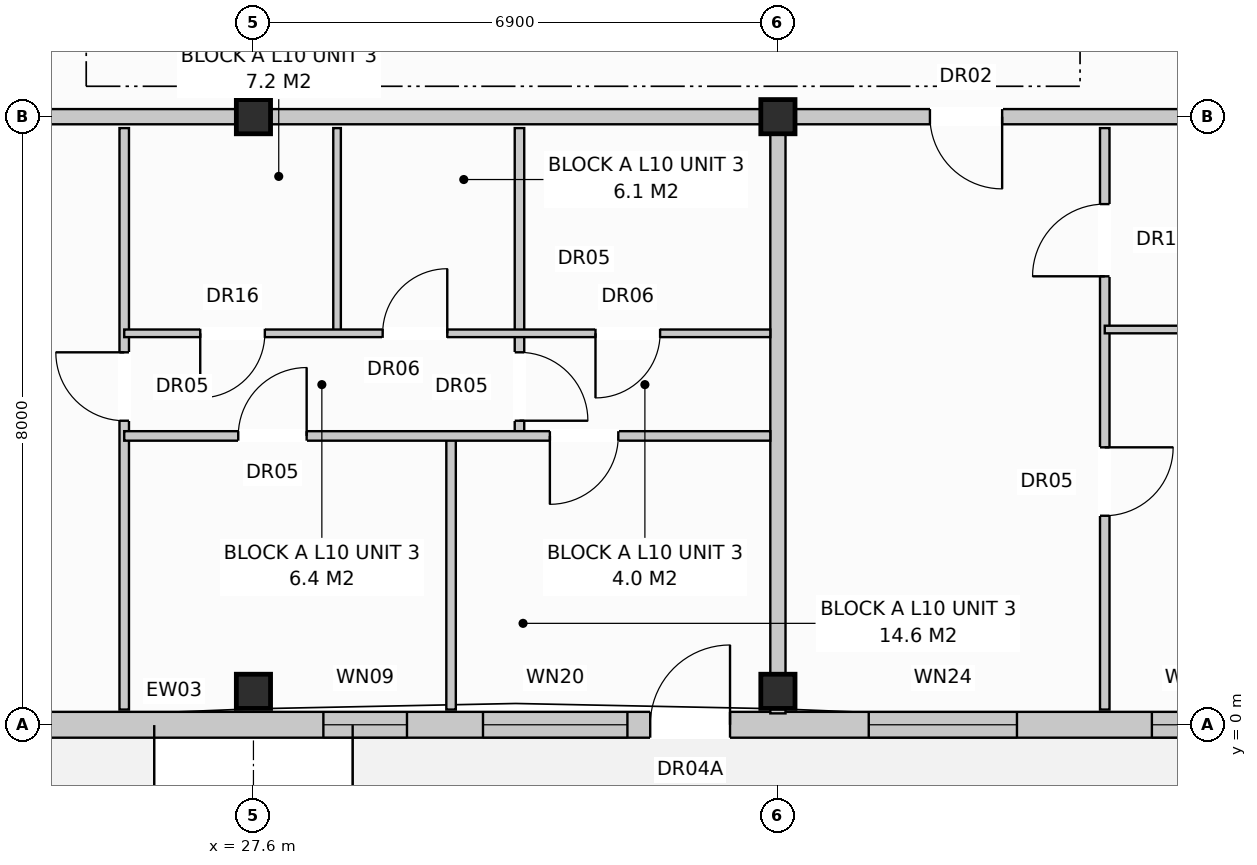
"""IFC4 building model, lengths in metres.
Left out: names, types, materials, properties, quantities, classifications, styles, units other than length and angle.
Written with IfcOpenShell. Run it as: python <this file> out.ifc"""

import sys

from ifc_helpers import new_model, si_unit, direction, frame, frame_2d, origin, origin_with_axes, origin_2d, place, context, subcontext, project, spatial, rectangle, extrude, element, fill, save


model = new_model("IFC4")
c1 = context("Model", 3, precision=1e-05, world=origin(), true_north=direction((0.0, 1.0)))
c2 = subcontext(c1, "Body", "Model", "MODEL_VIEW")
j1 = project(units=[si_unit("LENGTHUNIT", "METRE"), si_unit("PLANEANGLEUNIT", "RADIAN")], contexts=[c1])
p1 = place(None, origin())
s1 = spatial("IfcSite", under=j1, at=p1, CompositionType="ELEMENT")
p2 = place(p1, origin())
s2 = spatial("IfcBuilding", under=s1, at=p2, CompositionType="ELEMENT")
p3 = place(p2, frame((0.0, 0.0, 33.6)))
s3 = spatial("IfcBuildingStorey", under=s2, at=p3, CompositionType="ELEMENT", Elevation=33.6)
for number, where, z_axis, x_axis in (
    (1, (27.6, 0.44, 0.0), (0.0, 0.0, 1.0), (1.0, 0.0, 0.0)),
    (2, (27.6, 8.0, 0.0), (0.0, 0.0, 1.0), (1.0, 0.0, 0.0)),
    (3, (34.5, 0.44, 0.0), (0.0, 0.0, 1.0), (1.0, 0.0, 0.0)),
    (4, (34.5, 8.0, 0.0), (0.0, 0.0, 1.0), (1.0, 0.0, 0.0)),
):
    element("IfcColumn", number, at=place(p3, frame(where, z_axis=z_axis, x_axis=x_axis)), inside=s3, PredefinedType="COLUMN", context=c2, shape_type="SweptSolid", body=[
        extrude(rectangle(XDim=0.45, YDim=0.45, at=origin_2d()), origin(), (0.0, 0.0, 1.0), 3.2),
    ])
p4 = place(p3, frame((0.16, 0.0, 0.0), z_axis=(0.0, 0.0, 1.0), x_axis=(1.0, 0.0, 0.0)))
e5 = element("IfcWall", 5, at=p4, inside=s3, PredefinedType="STANDARD", context=c2, shape_type="SweptSolid", body=[
    extrude(rectangle(XDim=41.08, YDim=0.34, at=frame_2d((20.54, 0.0))), origin(), (0.0, 0.0, 1.0), 2.96),
])
p5 = place(p4, frame((2.465, 0.0, 0.0)))
e6 = element("IfcOpeningElement", 6, at=p5, cuts=e5, PredefinedType="OPENING", context=c2, shape_type="SweptSolid", body=[
    extrude(rectangle(XDim=1.05, YDim=2.12, at=frame_2d((0.525, 1.06))), frame((0.0, 0.182, 0.0), z_axis=(0.0, -1.0, 0.0), x_axis=(1.0, 0.0, 0.0)), (0.0, 0.0, 1.0), 0.364),
])
p6 = place(p4, frame((18.86, 0.0, 0.0)))
e7 = element("IfcOpeningElement", 7, at=p6, cuts=e5, PredefinedType="OPENING", context=c2, shape_type="SweptSolid", body=[
    extrude(rectangle(XDim=1.05, YDim=2.12, at=frame_2d((0.525, 1.06))), frame((0.0, 0.182, 0.0), z_axis=(0.0, -1.0, 0.0), x_axis=(1.0, 0.0, 0.0)), (0.0, 0.0, 1.0), 0.364),
])
p7 = place(p4, frame((32.66, 0.0, 0.0)))
e8 = element("IfcOpeningElement", 8, at=p7, cuts=e5, PredefinedType="OPENING", context=c2, shape_type="SweptSolid", body=[
    extrude(rectangle(XDim=1.05, YDim=2.12, at=frame_2d((0.525, 1.06))), frame((0.0, 0.182, 0.0), z_axis=(0.0, -1.0, 0.0), x_axis=(1.0, 0.0, 0.0)), (0.0, 0.0, 1.0), 0.364),
])
p8 = place(p4, frame((0.76, 0.0, 0.72)))
e9 = element("IfcOpeningElement", 9, at=p8, cuts=e5, PredefinedType="OPENING", context=c2, shape_type="SweptSolid", body=[
    extrude(rectangle(XDim=1.1, YDim=1.5, at=frame_2d((0.55, 0.75))), frame((0.0, 0.182, 0.0), z_axis=(0.0, -1.0, 0.0), x_axis=(1.0, 0.0, 0.0)), (0.0, 0.0, 1.0), 0.364),
])
p9 = place(p4, frame((4.26, 0.0, 0.72)))
e10 = element("IfcOpeningElement", 10, at=p9, cuts=e5, PredefinedType="OPENING", context=c2, shape_type="SweptSolid", body=[
    extrude(rectangle(XDim=1.9, YDim=1.85, at=frame_2d((0.95, 0.925))), frame((0.0, 0.182, 0.0), z_axis=(0.0, -1.0, 0.0), x_axis=(1.0, 0.0, 0.0)), (0.0, 0.0, 1.0), 0.364),
])
p10 = place(p4, frame((7.935, 0.0, 0.8)))
e11 = element("IfcOpeningElement", 11, at=p10, cuts=e5, PredefinedType="OPENING", context=c2, shape_type="SweptSolid", body=[
    extrude(rectangle(XDim=1.95, YDim=1.65, at=frame_2d((0.975, 0.825))), frame((0.0, 0.182, 0.0), z_axis=(0.0, -1.0, 0.0), x_axis=(1.0, 0.0, 0.0)), (0.0, 0.0, 1.0), 0.364),
])
p11 = place(p4, frame((11.66, 0.0, 0.72)))
e12 = element("IfcOpeningElement", 12, at=p11, cuts=e5, PredefinedType="OPENING", context=c2, shape_type="SweptSolid", body=[
    extrude(rectangle(XDim=1.1, YDim=1.5, at=frame_2d((0.55, 0.75))), frame((0.0, 0.182, 0.0), z_axis=(0.0, -1.0, 0.0), x_axis=(1.0, 0.0, 0.0)), (0.0, 0.0, 1.0), 0.364),
])
p12 = place(p4, frame((16.735, 0.0, 0.8)))
e13 = element("IfcOpeningElement", 13, at=p12, cuts=e5, PredefinedType="OPENING", context=c2, shape_type="SweptSolid", body=[
    extrude(rectangle(XDim=1.9, YDim=1.85, at=frame_2d((0.95, 0.925))), frame((0.0, 0.182, 0.0), z_axis=(0.0, -1.0, 0.0), x_axis=(1.0, 0.0, 0.0)), (0.0, 0.0, 1.0), 0.364),
])
p13 = place(p4, frame((22.235, 0.0, 0.8)))
e14 = element("IfcOpeningElement", 14, at=p13, cuts=e5, PredefinedType="OPENING", context=c2, shape_type="SweptSolid", body=[
    extrude(rectangle(XDim=1.95, YDim=1.65, at=frame_2d((0.975, 0.825))), frame((0.0, 0.182, 0.0), z_axis=(0.0, -1.0, 0.0), x_axis=(1.0, 0.0, 0.0)), (0.0, 0.0, 1.0), 0.364),
])
p14 = place(p4, frame((28.36, 0.0, 0.72)))
e15 = element("IfcOpeningElement", 15, at=p14, cuts=e5, PredefinedType="OPENING", context=c2, shape_type="SweptSolid", body=[
    extrude(rectangle(XDim=1.1, YDim=1.5, at=frame_2d((0.55, 0.75))), frame((0.0, 0.182, 0.0), z_axis=(0.0, -1.0, 0.0), x_axis=(1.0, 0.0, 0.0)), (0.0, 0.0, 1.0), 0.364),
])
p15 = place(p4, frame((30.46, 0.0, 0.8)))
e16 = element("IfcOpeningElement", 16, at=p15, cuts=e5, PredefinedType="OPENING", context=c2, shape_type="SweptSolid", body=[
    extrude(rectangle(XDim=1.9, YDim=1.85, at=frame_2d((0.95, 0.925))), frame((0.0, 0.182, 0.0), z_axis=(0.0, -1.0, 0.0), x_axis=(1.0, 0.0, 0.0)), (0.0, 0.0, 1.0), 0.364),
])
p16 = place(p4, frame((35.535, 0.0, 0.8)))
e17 = element("IfcOpeningElement", 17, at=p16, cuts=e5, PredefinedType="OPENING", context=c2, shape_type="SweptSolid", body=[
    extrude(rectangle(XDim=1.95, YDim=1.65, at=frame_2d((0.975, 0.825))), frame((0.0, 0.182, 0.0), z_axis=(0.0, -1.0, 0.0), x_axis=(1.0, 0.0, 0.0)), (0.0, 0.0, 1.0), 0.364),
])
p17 = place(p4, frame((39.26, 0.0, 0.72)))
e18 = element("IfcOpeningElement", 18, at=p17, cuts=e5, PredefinedType="OPENING", context=c2, shape_type="SweptSolid", body=[
    extrude(rectangle(XDim=1.1, YDim=1.5, at=frame_2d((0.55, 0.75))), frame((0.0, 0.182, 0.0), z_axis=(0.0, -1.0, 0.0), x_axis=(1.0, 0.0, 0.0)), (0.0, 0.0, 1.0), 0.364),
])
p18 = place(p3, frame((34.5, 7.85, 0.0), z_axis=(0.0, 0.0, 1.0), x_axis=(0.0, -1.0, 0.0)))
e19 = element("IfcWall", 19, at=p18, inside=s3, PredefinedType="PARTITIONING", context=c2, shape_type="SweptSolid", body=[
    extrude(rectangle(XDim=7.7, YDim=0.2, at=frame_2d((3.85, 0.0))), origin(), (0.0, 0.0, 1.0), 2.4),
])
p19 = place(p3, frame((20.7, 8.0, 0.0), z_axis=(0.0, 0.0, 1.0), x_axis=(1.0, 0.0, 0.0)))
e20 = element("IfcWall", 20, at=p19, inside=s3, PredefinedType="PARTITIONING", context=c2, shape_type="SweptSolid", body=[
    extrude(rectangle(XDim=13.8, YDim=0.2, at=frame_2d((6.9, 0.0))), origin(), (0.0, 0.0, 1.0), 2.4),
])
p20 = place(p19, frame((2.4, 0.0, 0.0)))
e21 = element("IfcOpeningElement", 21, at=p20, cuts=e20, PredefinedType="OPENING", context=c2, shape_type="SweptSolid", body=[
    extrude(rectangle(XDim=0.95, YDim=2.15, at=frame_2d((0.475, 1.075))), frame((0.0, 0.112, 0.0), z_axis=(0.0, -1.0, 0.0), x_axis=(1.0, 0.0, 0.0)), (0.0, 0.0, 1.0), 0.224),
])
p21 = place(p3, frame((25.9, 7.85, 0.0), z_axis=(0.0, 0.0, 1.0), x_axis=(0.0, -1.0, 0.0)))
e22 = element("IfcWall", 22, at=p21, inside=s3, PredefinedType="PARTITIONING", context=c2, shape_type="SweptSolid", body=[
    extrude(rectangle(XDim=7.65, YDim=0.125, at=frame_2d((3.825, 0.0))), origin(), (0.0, 0.0, 1.0), 2.59),
])
p22 = place(p21, frame((2.95, 0.0, 0.0)))
e23 = element("IfcOpeningElement", 23, at=p22, cuts=e22, PredefinedType="OPENING", context=c2, shape_type="SweptSolid", body=[
    extrude(rectangle(XDim=0.9, YDim=2.1, at=frame_2d((0.45, 1.05))), frame((0.0, 0.074, 0.0), z_axis=(0.0, -1.0, 0.0), x_axis=(1.0, 0.0, 0.0)), (0.0, 0.0, 1.0), 0.149),
])
p23 = place(p3, frame((28.7, 7.85, 0.0), z_axis=(0.0, 0.0, 1.0), x_axis=(0.0, -1.0, 0.0)))
e24 = element("IfcWall", 24, at=p23, inside=s3, PredefinedType="PARTITIONING", context=c2, shape_type="SweptSolid", body=[
    extrude(rectangle(XDim=2.7, YDim=0.1, at=frame_2d((1.35, 0.0))), origin(), (0.0, 0.0, 1.0), 2.96),
])
p24 = place(p3, frame((31.1, 7.85, 0.0), z_axis=(0.0, 0.0, 1.0), x_axis=(0.0, -1.0, 0.0)))
e25 = element("IfcWall", 25, at=p24, inside=s3, PredefinedType="PARTITIONING", context=c2, shape_type="SweptSolid", body=[
    extrude(rectangle(XDim=4.05, YDim=0.125, at=frame_2d((2.025, 0.0))), origin(), (0.0, 0.0, 1.0), 2.96),
])
p25 = place(p24, frame((2.95, 0.0, 0.0)))
e26 = element("IfcOpeningElement", 26, at=p25, cuts=e25, PredefinedType="OPENING", context=c2, shape_type="SweptSolid", body=[
    extrude(rectangle(XDim=0.9, YDim=2.1, at=frame_2d((0.45, 1.05))), frame((0.0, 0.074, 0.0), z_axis=(0.0, -1.0, 0.0), x_axis=(1.0, 0.0, 0.0)), (0.0, 0.0, 1.0), 0.149),
])
p26 = place(p3, frame((30.2, 3.8, 0.0), z_axis=(0.0, 0.0, 1.0), x_axis=(0.0, -1.0, 0.0)))
e27 = element("IfcWall", 27, at=p26, inside=s3, PredefinedType="PARTITIONING", context=c2, shape_type="SweptSolid", body=[
    extrude(rectangle(XDim=3.6, YDim=0.125, at=frame_2d((1.8, 0.0))), origin(), (0.0, 0.0, 1.0), 2.96),
])
p27 = place(p3, frame((25.9, 5.15, 0.0), z_axis=(0.0, 0.0, 1.0), x_axis=(1.0, 0.0, 0.0)))
e28 = element("IfcWall", 28, at=p27, inside=s3, PredefinedType="PARTITIONING", context=c2, shape_type="SweptSolid", body=[
    extrude(rectangle(XDim=8.5, YDim=0.1, at=frame_2d((4.25, 0.0))), origin(), (0.0, 0.0, 1.0), 2.96),
])
p28 = place(p27, frame((1.0, 0.0, 0.0)))
e29 = element("IfcOpeningElement", 29, at=p28, cuts=e28, PredefinedType="OPENING", context=c2, shape_type="SweptSolid", body=[
    extrude(rectangle(XDim=0.85, YDim=2.1, at=frame_2d((0.425, 1.05))), frame((0.0, 0.062, 0.0), z_axis=(0.0, -1.0, 0.0), x_axis=(1.0, 0.0, 0.0)), (0.0, 0.0, 1.0), 0.124),
])
p29 = place(p27, frame((3.4, 0.0, 0.0)))
e30 = element("IfcOpeningElement", 30, at=p29, cuts=e28, PredefinedType="OPENING", context=c2, shape_type="SweptSolid", body=[
    extrude(rectangle(XDim=0.85, YDim=2.05, at=frame_2d((0.425, 1.025))), frame((0.0, 0.062, 0.0), z_axis=(0.0, -1.0, 0.0), x_axis=(1.0, 0.0, 0.0)), (0.0, 0.0, 1.0), 0.124),
])
p30 = place(p27, frame((6.2, 0.0, 0.0)))
e31 = element("IfcOpeningElement", 31, at=p30, cuts=e28, PredefinedType="OPENING", context=c2, shape_type="SweptSolid", body=[
    extrude(rectangle(XDim=0.85, YDim=2.05, at=frame_2d((0.425, 1.025))), frame((0.0, 0.062, 0.0), z_axis=(0.0, -1.0, 0.0), x_axis=(1.0, 0.0, 0.0)), (0.0, 0.0, 1.0), 0.124),
])
p31 = place(p3, frame((25.9, 3.8, 0.0), z_axis=(0.0, 0.0, 1.0), x_axis=(1.0, 0.0, 0.0)))
e32 = element("IfcWall", 32, at=p31, inside=s3, PredefinedType="PARTITIONING", context=c2, shape_type="SweptSolid", body=[
    extrude(rectangle(XDim=8.5, YDim=0.125, at=frame_2d((4.25, 0.0))), origin(), (0.0, 0.0, 1.0), 2.96),
])
p32 = place(p31, frame((1.5, 0.0, 0.0)))
e33 = element("IfcOpeningElement", 33, at=p32, cuts=e32, PredefinedType="OPENING", context=c2, shape_type="SweptSolid", body=[
    extrude(rectangle(XDim=0.9, YDim=2.1, at=frame_2d((0.45, 1.05))), frame((0.0, 0.074, 0.0), z_axis=(0.0, -1.0, 0.0), x_axis=(1.0, 0.0, 0.0)), (0.0, 0.0, 1.0), 0.149),
])
p33 = place(p31, frame((5.6, 0.0, 0.0)))
e34 = element("IfcOpeningElement", 34, at=p33, cuts=e32, PredefinedType="OPENING", context=c2, shape_type="SweptSolid", body=[
    extrude(rectangle(XDim=0.9, YDim=2.1, at=frame_2d((0.45, 1.05))), frame((0.0, 0.074, 0.0), z_axis=(0.0, -1.0, 0.0), x_axis=(1.0, 0.0, 0.0)), (0.0, 0.0, 1.0), 0.149),
])
p34 = place(p3, frame((34.5, 8.0, 0.0), z_axis=(0.0, 0.0, 1.0), x_axis=(1.0, 0.0, 0.0)))
e35 = element("IfcWall", 35, at=p34, inside=s3, PredefinedType="PARTITIONING", context=c2, shape_type="SweptSolid", body=[
    extrude(rectangle(XDim=6.9, YDim=0.2, at=frame_2d((3.45, 0.0))), origin(), (0.0, 0.0, 1.0), 2.4),
])
p35 = place(p34, frame((2.0, 0.0, 0.0)))
e36 = element("IfcOpeningElement", 36, at=p35, cuts=e35, PredefinedType="OPENING", context=c2, shape_type="SweptSolid", body=[
    extrude(rectangle(XDim=0.95, YDim=2.15, at=frame_2d((0.475, 1.075))), frame((0.0, 0.112, 0.0), z_axis=(0.0, -1.0, 0.0), x_axis=(1.0, 0.0, 0.0)), (0.0, 0.0, 1.0), 0.224),
])
p36 = place(p3, frame((38.8, 7.85, 0.0), z_axis=(0.0, 0.0, 1.0), x_axis=(0.0, -1.0, 0.0)))
e37 = element("IfcWall", 37, at=p36, inside=s3, PredefinedType="PARTITIONING", context=c2, shape_type="SweptSolid", body=[
    extrude(rectangle(XDim=7.65, YDim=0.125, at=frame_2d((3.825, 0.0))), origin(), (0.0, 0.0, 1.0), 2.96),
])
p37 = place(p36, frame((1.0, 0.0, 0.0)))
e38 = element("IfcOpeningElement", 38, at=p37, cuts=e37, PredefinedType="OPENING", context=c2, shape_type="SweptSolid", body=[
    extrude(rectangle(XDim=0.95, YDim=2.1, at=frame_2d((0.475, 1.05))), frame((0.0, 0.074, 0.0), z_axis=(0.0, -1.0, 0.0), x_axis=(1.0, 0.0, 0.0)), (0.0, 0.0, 1.0), 0.149),
])
p38 = place(p36, frame((4.2, 0.0, 0.0)))
e39 = element("IfcOpeningElement", 39, at=p38, cuts=e37, PredefinedType="OPENING", context=c2, shape_type="SweptSolid", body=[
    extrude(rectangle(XDim=0.9, YDim=2.1, at=frame_2d((0.45, 1.05))), frame((0.0, 0.074, 0.0), z_axis=(0.0, -1.0, 0.0), x_axis=(1.0, 0.0, 0.0)), (0.0, 0.0, 1.0), 0.149),
])
p39 = place(p3, frame((38.8, 5.2, 0.0), z_axis=(0.0, 0.0, 1.0), x_axis=(1.0, 0.0, 0.0)))
e40 = element("IfcWall", 40, at=p39, inside=s3, PredefinedType="PARTITIONING", context=c2, shape_type="SweptSolid", body=[
    extrude(rectangle(XDim=2.5, YDim=0.1, at=frame_2d((1.25, 0.0))), origin(), (0.0, 0.0, 1.0), 2.96),
])
p40 = place(p7, origin_with_axes())
e41 = element("IfcDoor", 41, at=p40, inside=s3, OperationType="SINGLE_SWING_RIGHT", PredefinedType="DOOR", context=c2, shape_type="SweptSolid", body=[
    extrude(rectangle(XDim=1.05, YDim=2.12, at=frame_2d((0.525, 1.06))), frame((0.0, 0.025, 0.0), z_axis=(0.0, -1.0, 0.0), x_axis=(1.0, 0.0, 0.0)), (0.0, 0.0, 1.0), 0.05),
])
fill(e8, e41)
p41 = place(p14, origin_with_axes())
e42 = element("IfcWindow", 42, at=p41, inside=s3, PartitioningType="SINGLE_PANEL", PredefinedType="WINDOW", context=c2, shape_type="SweptSolid", body=[
    extrude(rectangle(XDim=1.1, YDim=1.5, at=frame_2d((0.55, 0.75))), frame((0.0, 0.03, 0.0), z_axis=(0.0, -1.0, 0.0), x_axis=(1.0, 0.0, 0.0)), (0.0, 0.0, 1.0), 0.06),
])
fill(e15, e42)
p42 = place(p15, origin_with_axes())
e43 = element("IfcWindow", 43, at=p42, inside=s3, PartitioningType="SINGLE_PANEL", PredefinedType="WINDOW", context=c2, shape_type="SweptSolid", body=[
    extrude(rectangle(XDim=1.9, YDim=1.85, at=frame_2d((0.95, 0.925))), frame((0.0, 0.03, 0.0), z_axis=(0.0, -1.0, 0.0), x_axis=(1.0, 0.0, 0.0)), (0.0, 0.0, 1.0), 0.06),
])
fill(e16, e43)
p43 = place(p16, origin_with_axes())
e44 = element("IfcWindow", 44, at=p43, inside=s3, PartitioningType="SINGLE_PANEL", PredefinedType="WINDOW", context=c2, shape_type="SweptSolid", body=[
    extrude(rectangle(XDim=1.95, YDim=1.65, at=frame_2d((0.975, 0.825))), frame((0.0, 0.03, 0.0), z_axis=(0.0, -1.0, 0.0), x_axis=(1.0, 0.0, 0.0)), (0.0, 0.0, 1.0), 0.06),
])
fill(e17, e44)
p44 = place(p17, origin_with_axes())
e45 = element("IfcWindow", 45, at=p44, inside=s3, PartitioningType="SINGLE_PANEL", PredefinedType="WINDOW", context=c2, shape_type="SweptSolid", body=[
    extrude(rectangle(XDim=1.1, YDim=1.5, at=frame_2d((0.55, 0.75))), frame((0.0, 0.03, 0.0), z_axis=(0.0, -1.0, 0.0), x_axis=(1.0, 0.0, 0.0)), (0.0, 0.0, 1.0), 0.06),
])
fill(e18, e45)
p45 = place(p22, frame((0.9, 0.0, 0.0), z_axis=(0.0, 0.0, 1.0), x_axis=(-1.0, 0.0, 0.0)))
e46 = element("IfcDoor", 46, at=p45, inside=s3, OperationType="SINGLE_SWING_LEFT", PredefinedType="DOOR", context=c2, shape_type="SweptSolid", body=[
    extrude(rectangle(XDim=0.9, YDim=2.1, at=frame_2d((0.45, 1.05))), frame((0.0, 0.025, 0.0), z_axis=(0.0, -1.0, 0.0), x_axis=(1.0, 0.0, 0.0)), (0.0, 0.0, 1.0), 0.05),
])
fill(e23, e46)
p46 = place(p25, origin_with_axes())
e47 = element("IfcDoor", 47, at=p46, inside=s3, OperationType="SINGLE_SWING_RIGHT", PredefinedType="DOOR", context=c2, shape_type="SweptSolid", body=[
    extrude(rectangle(XDim=0.9, YDim=2.1, at=frame_2d((0.45, 1.05))), frame((0.0, 0.025, 0.0), z_axis=(0.0, -1.0, 0.0), x_axis=(1.0, 0.0, 0.0)), (0.0, 0.0, 1.0), 0.05),
])
fill(e26, e47)
p47 = place(p28, frame((0.85, 0.0, 0.0), z_axis=(0.0, 0.0, 1.0), x_axis=(-1.0, 0.0, 0.0)))
e48 = element("IfcDoor", 48, at=p47, inside=s3, OperationType="SINGLE_SWING_LEFT", PredefinedType="DOOR", context=c2, shape_type="SweptSolid", body=[
    extrude(rectangle(XDim=0.85, YDim=2.1, at=frame_2d((0.425, 1.05))), frame((0.0, 0.025, 0.0), z_axis=(0.0, -1.0, 0.0), x_axis=(1.0, 0.0, 0.0)), (0.0, 0.0, 1.0), 0.05),
])
fill(e29, e48)
p48 = place(p29, origin_with_axes())
e49 = element("IfcDoor", 49, at=p48, inside=s3, OperationType="SINGLE_SWING_RIGHT", PredefinedType="DOOR", context=c2, shape_type="SweptSolid", body=[
    extrude(rectangle(XDim=0.85, YDim=2.05, at=frame_2d((0.425, 1.025))), frame((0.0, 0.025, 0.0), z_axis=(0.0, -1.0, 0.0), x_axis=(1.0, 0.0, 0.0)), (0.0, 0.0, 1.0), 0.05),
])
fill(e30, e49)
p49 = place(p30, frame((0.85, 0.0, 0.0), z_axis=(0.0, 0.0, 1.0), x_axis=(-1.0, 0.0, 0.0)))
e50 = element("IfcDoor", 50, at=p49, inside=s3, OperationType="SINGLE_SWING_LEFT", PredefinedType="DOOR", context=c2, shape_type="SweptSolid", body=[
    extrude(rectangle(XDim=0.85, YDim=2.05, at=frame_2d((0.425, 1.025))), frame((0.0, 0.025, 0.0), z_axis=(0.0, -1.0, 0.0), x_axis=(1.0, 0.0, 0.0)), (0.0, 0.0, 1.0), 0.05),
])
fill(e31, e50)
p50 = place(p32, origin_with_axes())
e51 = element("IfcDoor", 51, at=p50, inside=s3, OperationType="SINGLE_SWING_RIGHT", PredefinedType="DOOR", context=c2, shape_type="SweptSolid", body=[
    extrude(rectangle(XDim=0.9, YDim=2.1, at=frame_2d((0.45, 1.05))), frame((0.0, 0.025, 0.0), z_axis=(0.0, -1.0, 0.0), x_axis=(1.0, 0.0, 0.0)), (0.0, 0.0, 1.0), 0.05),
])
fill(e33, e51)
p51 = place(p33, frame((0.9, 0.0, 0.0), z_axis=(0.0, 0.0, 1.0), x_axis=(-1.0, 0.0, 0.0)))
e52 = element("IfcDoor", 52, at=p51, inside=s3, OperationType="SINGLE_SWING_LEFT", PredefinedType="DOOR", context=c2, shape_type="SweptSolid", body=[
    extrude(rectangle(XDim=0.9, YDim=2.1, at=frame_2d((0.45, 1.05))), frame((0.0, 0.025, 0.0), z_axis=(0.0, -1.0, 0.0), x_axis=(1.0, 0.0, 0.0)), (0.0, 0.0, 1.0), 0.05),
])
fill(e34, e52)
p52 = place(p35, frame((0.95, 0.0, 0.0), z_axis=(0.0, 0.0, 1.0), x_axis=(-1.0, 0.0, 0.0)))
e53 = element("IfcDoor", 53, at=p52, inside=s3, OperationType="SINGLE_SWING_RIGHT", PredefinedType="DOOR", context=c2, shape_type="SweptSolid", body=[
    extrude(rectangle(XDim=0.95, YDim=2.15, at=frame_2d((0.475, 1.075))), frame((0.0, 0.025, 0.0), z_axis=(0.0, -1.0, 0.0), x_axis=(1.0, 0.0, 0.0)), (0.0, 0.0, 1.0), 0.05),
])
fill(e36, e53)
p53 = place(p37, frame((0.95, 0.0, 0.0), z_axis=(0.0, 0.0, 1.0), x_axis=(-1.0, 0.0, 0.0)))
e54 = element("IfcDoor", 54, at=p53, inside=s3, OperationType="SINGLE_SWING_RIGHT", PredefinedType="DOOR", context=c2, shape_type="SweptSolid", body=[
    extrude(rectangle(XDim=0.95, YDim=2.1, at=frame_2d((0.475, 1.05))), frame((0.0, 0.025, 0.0), z_axis=(0.0, -1.0, 0.0), x_axis=(1.0, 0.0, 0.0)), (0.0, 0.0, 1.0), 0.05),
])
fill(e38, e54)
p54 = place(p38, origin_with_axes())
e55 = element("IfcDoor", 55, at=p54, inside=s3, OperationType="SINGLE_SWING_LEFT", PredefinedType="DOOR", context=c2, shape_type="SweptSolid", body=[
    extrude(rectangle(XDim=0.9, YDim=2.1, at=frame_2d((0.45, 1.05))), frame((0.0, 0.025, 0.0), z_axis=(0.0, -1.0, 0.0), x_axis=(1.0, 0.0, 0.0)), (0.0, 0.0, 1.0), 0.05),
])
fill(e39, e55)
save(model, sys.argv[1])
